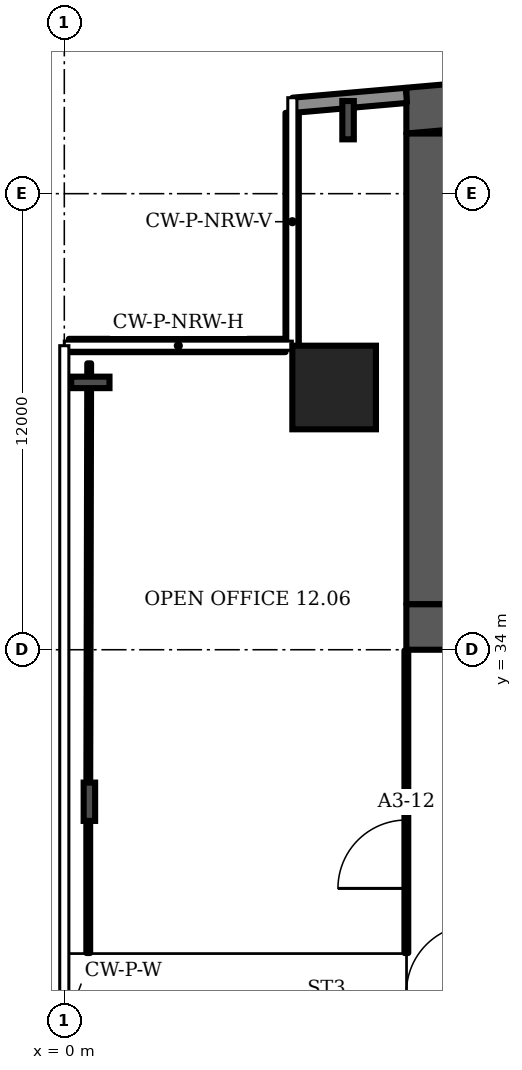
"""IFC4 building model, lengths in metres.
Left out: names, types, materials, properties, quantities, classifications, styles, units other than length and angle.
Written with IfcOpenShell. Run it as: python <this file> out.ifc"""

import sys

from ifc_helpers import new_model, si_unit, direction, frame, frame_2d, origin, origin_2d, place, context, subcontext, project, spatial, polyline, rectangle, i_section, outline, extrude, element, fill, save


model = new_model("IFC4")
c1 = context("Model", 3, precision=1e-05, world=origin(), true_north=direction((0.0, 1.0)))
c2 = subcontext(c1, "Body", "Model", "MODEL_VIEW")
j1 = project(units=[si_unit("LENGTHUNIT", "METRE"), si_unit("PLANEANGLEUNIT", "RADIAN")], contexts=[c1])
p1 = place(None, origin())
s1 = spatial("IfcSite", under=j1, at=p1, CompositionType="ELEMENT")
p2 = place(p1, origin())
s2 = spatial("IfcBuilding", under=s1, at=p2, CompositionType="ELEMENT")
p3 = place(p2, frame((0.0, 0.0, 63.1)))
s3 = spatial("IfcBuildingStorey", under=s2, at=p3, CompositionType="ELEMENT", Elevation=63.1)
p4 = place(p3, frame((0.0, 0.0, -0.0)))
e1 = element("IfcWall", 1, at=p4, inside=s3, PredefinedType="SHEAR", context=c2, shape_type="SweptSolid", body=[
    extrude(outline(polyline([(9.0, 47.583), (37.0, 50.032), (65.0, 47.583), (65.0, 48.787), (37.0, 51.237), (9.0, 48.787), (9.0, 47.583)])), origin(), (0.0, 0.0, 1.0), 3.6),
])
p5 = place(p3, frame((9.0, 34.6, 0.0), z_axis=(0.0, 0.0, 1.0), x_axis=(1.0, 0.0, 0.0)))
e2 = element("IfcWall", 2, at=p5, inside=s3, PredefinedType="SHEAR", context=c2, shape_type="SweptSolid", body=[
    extrude(rectangle(XDim=56.0, YDim=1.2, at=frame_2d((28.0, 0.0))), origin(), (0.0, 0.0, 1.0), 3.6),
])
p6 = place(p5, frame((3.3, 0.0, 0.0)))
e3 = element("IfcOpeningElement", 3, at=p6, cuts=e2, PredefinedType="OPENING", context=c2, shape_type="SweptSolid", body=[
    extrude(rectangle(XDim=1.0, YDim=2.1, at=frame_2d((0.5, 1.05))), frame((0.0, 0.61, 0.0), z_axis=(0.0, -1.0, 0.0), x_axis=(1.0, 0.0, 0.0)), (0.0, 0.0, 1.0), 1.22),
])
p7 = place(p5, frame((7.867, 0.0, 0.0)))
e4 = element("IfcOpeningElement", 4, at=p7, cuts=e2, PredefinedType="OPENING", context=c2, shape_type="SweptSolid", body=[
    extrude(rectangle(XDim=1.1, YDim=2.1, at=frame_2d((0.55, 1.05))), frame((0.0, 0.61, 0.0), z_axis=(0.0, -1.0, 0.0), x_axis=(1.0, 0.0, 0.0)), (0.0, 0.0, 1.0), 1.22),
])
p8 = place(p5, frame((12.033, 0.0, 0.0)))
e5 = element("IfcOpeningElement", 5, at=p8, cuts=e2, PredefinedType="OPENING", context=c2, shape_type="SweptSolid", body=[
    extrude(rectangle(XDim=1.1, YDim=2.1, at=frame_2d((0.55, 1.05))), frame((0.0, 0.61, 0.0), z_axis=(0.0, -1.0, 0.0), x_axis=(1.0, 0.0, 0.0)), (0.0, 0.0, 1.0), 1.22),
])
p9 = place(p5, frame((9.8, 0.0, 0.0)))
e6 = element("IfcOpeningElement", 6, at=p9, cuts=e2, PredefinedType="OPENING", context=c2, shape_type="SweptSolid", body=[
    extrude(rectangle(XDim=1.4, YDim=2.1, at=frame_2d((0.7, 1.05))), frame((0.0, 0.61, 0.0), z_axis=(0.0, -1.0, 0.0), x_axis=(1.0, 0.0, 0.0)), (0.0, 0.0, 1.0), 1.22),
])
p10 = place(p5, frame((14.65, 0.0, 0.0)))
e7 = element("IfcOpeningElement", 7, at=p10, cuts=e2, PredefinedType="OPENING", context=c2, shape_type="SweptSolid", body=[
    extrude(rectangle(XDim=1.2, YDim=2.1, at=frame_2d((0.6, 1.05))), frame((0.0, 0.61, 0.0), z_axis=(0.0, -1.0, 0.0), x_axis=(1.0, 0.0, 0.0)), (0.0, 0.0, 1.0), 1.22),
])
p11 = place(p5, frame((21.867, 0.0, 0.0)))
e8 = element("IfcOpeningElement", 8, at=p11, cuts=e2, PredefinedType="OPENING", context=c2, shape_type="SweptSolid", body=[
    extrude(rectangle(XDim=1.1, YDim=2.1, at=frame_2d((0.55, 1.05))), frame((0.0, 0.61, 0.0), z_axis=(0.0, -1.0, 0.0), x_axis=(1.0, 0.0, 0.0)), (0.0, 0.0, 1.0), 1.22),
])
p12 = place(p5, frame((26.033, 0.0, 0.0)))
e9 = element("IfcOpeningElement", 9, at=p12, cuts=e2, PredefinedType="OPENING", context=c2, shape_type="SweptSolid", body=[
    extrude(rectangle(XDim=1.1, YDim=2.1, at=frame_2d((0.55, 1.05))), frame((0.0, 0.61, 0.0), z_axis=(0.0, -1.0, 0.0), x_axis=(1.0, 0.0, 0.0)), (0.0, 0.0, 1.0), 1.22),
])
p13 = place(p5, frame((23.8, 0.0, 0.0)))
e10 = element("IfcOpeningElement", 10, at=p13, cuts=e2, PredefinedType="OPENING", context=c2, shape_type="SweptSolid", body=[
    extrude(rectangle(XDim=1.4, YDim=2.1, at=frame_2d((0.7, 1.05))), frame((0.0, 0.61, 0.0), z_axis=(0.0, -1.0, 0.0), x_axis=(1.0, 0.0, 0.0)), (0.0, 0.0, 1.0), 1.22),
])
p14 = place(p5, frame((28.867, 0.0, 0.0)))
e11 = element("IfcOpeningElement", 11, at=p14, cuts=e2, PredefinedType="OPENING", context=c2, shape_type="SweptSolid", body=[
    extrude(rectangle(XDim=1.1, YDim=2.1, at=frame_2d((0.55, 1.05))), frame((0.0, 0.61, 0.0), z_axis=(0.0, -1.0, 0.0), x_axis=(1.0, 0.0, 0.0)), (0.0, 0.0, 1.0), 1.22),
])
p15 = place(p5, frame((33.033, 0.0, 0.0)))
e12 = element("IfcOpeningElement", 12, at=p15, cuts=e2, PredefinedType="OPENING", context=c2, shape_type="SweptSolid", body=[
    extrude(rectangle(XDim=1.1, YDim=2.1, at=frame_2d((0.55, 1.05))), frame((0.0, 0.61, 0.0), z_axis=(0.0, -1.0, 0.0), x_axis=(1.0, 0.0, 0.0)), (0.0, 0.0, 1.0), 1.22),
])
p16 = place(p5, frame((40.15, 0.0, 0.0)))
e13 = element("IfcOpeningElement", 13, at=p16, cuts=e2, PredefinedType="OPENING", context=c2, shape_type="SweptSolid", body=[
    extrude(rectangle(XDim=1.2, YDim=2.1, at=frame_2d((0.6, 1.05))), frame((0.0, 0.61, 0.0), z_axis=(0.0, -1.0, 0.0), x_axis=(1.0, 0.0, 0.0)), (0.0, 0.0, 1.0), 1.22),
])
p17 = place(p5, frame((44.8, 0.0, 0.0)))
e14 = element("IfcOpeningElement", 14, at=p17, cuts=e2, PredefinedType="OPENING", context=c2, shape_type="SweptSolid", body=[
    extrude(rectangle(XDim=1.4, YDim=2.1, at=frame_2d((0.7, 1.05))), frame((0.0, 0.61, 0.0), z_axis=(0.0, -1.0, 0.0), x_axis=(1.0, 0.0, 0.0)), (0.0, 0.0, 1.0), 1.22),
])
p18 = place(p5, frame((49.867, 0.0, 0.0)))
e15 = element("IfcOpeningElement", 15, at=p18, cuts=e2, PredefinedType="OPENING", context=c2, shape_type="SweptSolid", body=[
    extrude(rectangle(XDim=1.1, YDim=2.1, at=frame_2d((0.55, 1.05))), frame((0.0, 0.61, 0.0), z_axis=(0.0, -1.0, 0.0), x_axis=(1.0, 0.0, 0.0)), (0.0, 0.0, 1.0), 1.22),
])
p19 = place(p5, frame((53.5, 0.0, 0.0)))
e16 = element("IfcOpeningElement", 16, at=p19, cuts=e2, PredefinedType="OPENING", context=c2, shape_type="SweptSolid", body=[
    extrude(rectangle(XDim=1.1, YDim=2.1, at=frame_2d((0.55, 1.05))), frame((0.0, 0.61, 0.0), z_axis=(0.0, -1.0, 0.0), x_axis=(1.0, 0.0, 0.0)), (0.0, 0.0, 1.0), 1.22),
])
p20 = place(p5, frame((51.567, 0.0, 0.0)))
e17 = element("IfcOpeningElement", 17, at=p20, cuts=e2, PredefinedType="OPENING", context=c2, shape_type="SweptSolid", body=[
    extrude(rectangle(XDim=1.4, YDim=2.1, at=frame_2d((0.7, 1.05))), frame((0.0, 0.61, 0.0), z_axis=(0.0, -1.0, 0.0), x_axis=(1.0, 0.0, 0.0)), (0.0, 0.0, 1.0), 1.22),
])
p21 = place(p3, frame((9.6, 35.2, 0.0), z_axis=(0.0, 0.0, 1.0), x_axis=(0.0, 1.0, 0.0)))
e18 = element("IfcWall", 18, at=p21, inside=s3, PredefinedType="SHEAR", context=c2, shape_type="SweptSolid", body=[
    extrude(rectangle(XDim=12.383, YDim=1.2, at=frame_2d((6.191, 0.0))), origin(), (0.0, 0.0, 1.0), 3.6),
])
p22 = place(p3, frame((7.1, 40.9, 0.0), z_axis=(0.0, 0.0, 1.0), x_axis=(1.0, 0.0, 0.0)))
e19 = element("IfcColumn", 19, at=p22, inside=s3, PredefinedType="COLUMN", context=c2, shape_type="SweptSolid", body=[
    extrude(rectangle(XDim=2.2, YDim=2.2, at=origin_2d()), origin(), (0.0, 0.0, 1.0), 3.6),
])
for number, where, z_axis, x_axis in (
    (20, (7.467, 47.934, 0.0), (0.0, 0.0, 1.0), (-1.0, 0.0, 0.0)),
    (21, (0.685, 41.034, 0.0), (0.0, 0.0, 1.0), (0.0, 1.0, 0.0)),
    (22, (0.66, 30.0, 0.0), (0.0, 0.0, 1.0), (-1.0, 0.0, 0.0)),
):
    element("IfcColumn", number, at=place(p3, frame(where, z_axis=z_axis, x_axis=x_axis)), inside=s3, PredefinedType="COLUMN", context=c2, shape_type="SweptSolid", body=[
        extrude(i_section(OverallWidth=0.302, OverallDepth=1.008, WebThickness=0.021, FlangeThickness=0.04, FilletRadius=0.03, at=origin_2d()), origin(), (0.0, 0.0, 1.0), 3.6),
    ])
p23 = place(p3, frame((9.0, 48.587, 0.0), z_axis=(0.0, 0.0, 1.0), x_axis=(-0.996194, -0.087168, 0.0)))
e23 = element("IfcWall", 23, at=p23, inside=s3, PredefinedType="SOLIDWALL", context=c2, shape_type="SweptSolid", body=[
    extrude(rectangle(XDim=2.994, YDim=0.4, at=frame_2d((1.497, 0.0))), origin(), (0.0, 0.0, 1.0), 3.2),
])
p24 = place(p3, frame((5.995, 48.126, 0.0), z_axis=(0.0, 0.0, 1.0), x_axis=(0.0, -1.0, 0.0)))
e24 = element("IfcWall", 24, at=p24, inside=s3, PredefinedType="SOLIDWALL", context=c2, shape_type="SweptSolid", body=[
    extrude(rectangle(XDim=6.126, YDim=0.35, at=frame_2d((3.063, 0.0))), origin(), (0.0, 0.0, 1.0), 1.0),
])
p25 = place(p3, frame((5.82, 42.005, 0.0), z_axis=(0.0, 0.0, 1.0), x_axis=(-1.0, 0.0, 0.0)))
e25 = element("IfcWall", 25, at=p25, inside=s3, PredefinedType="SOLIDWALL", context=c2, shape_type="SweptSolid", body=[
    extrude(rectangle(XDim=5.7, YDim=0.35, at=frame_2d((2.85, 0.0))), origin(), (0.0, 0.0, 1.0), 1.0),
])
p26 = place(p3, frame((0.63, 26.02, 0.0), z_axis=(0.0, 0.0, 1.0), x_axis=(0.0, 1.0, 0.0)))
e26 = element("IfcWall", 26, at=p26, inside=s3, PredefinedType="PARTITIONING", context=c2, shape_type="SweptSolid", body=[
    extrude(rectangle(XDim=3.98, YDim=0.1, at=frame_2d((1.99, 0.0))), origin(), (0.0, 0.0, 1.0), 2.58),
])
p27 = place(p3, frame((0.63, 30.0, 0.0), z_axis=(0.0, 0.0, 1.0), x_axis=(0.00218, 0.999994, 0.0)))
e27 = element("IfcWall", 27, at=p27, inside=s3, PredefinedType="PARTITIONING", context=c2, shape_type="SweptSolid", body=[
    extrude(rectangle(XDim=11.535, YDim=0.1, at=frame_2d((5.768, 0.0))), origin(), (0.0, 0.0, 1.0), 2.58),
])
p28 = place(p3, frame((9.0, 26.02, 0.0), z_axis=(0.0, 0.0, 1.0), x_axis=(0.0, 1.0, 0.0)))
e28 = element("IfcWall", 28, at=p28, inside=s3, PredefinedType="PARTITIONING", context=c2, shape_type="SweptSolid", body=[
    extrude(rectangle(XDim=7.96, YDim=0.1, at=frame_2d((3.98, 0.0))), origin(), (0.0, 0.0, 1.0), 3.2),
])
p29 = place(p28, frame((1.7, 0.0, 0.0)))
e29 = element("IfcOpeningElement", 29, at=p29, cuts=e28, PredefinedType="OPENING", context=c2, shape_type="SweptSolid", body=[
    extrude(rectangle(XDim=1.8, YDim=2.1, at=frame_2d((0.9, 1.05))), frame((0.0, 0.06, 0.0), z_axis=(0.0, -1.0, 0.0), x_axis=(1.0, 0.0, 0.0)), (0.0, 0.0, 1.0), 0.12),
])
p30 = place(p29, origin())
e30 = element("IfcDoor", 30, at=p30, inside=s3, OperationType="DOUBLE_DOOR_SINGLE_SWING", PredefinedType="DOOR", context=c2, shape_type="SweptSolid", body=[
    extrude(rectangle(XDim=1.8, YDim=2.1, at=frame_2d((0.9, 1.05))), frame((0.0, 0.025, 0.0), z_axis=(0.0, -1.0, 0.0), x_axis=(1.0, 0.0, 0.0)), (0.0, 0.0, 1.0), 0.05),
])
fill(e29, e30)
save(model, sys.argv[1])
